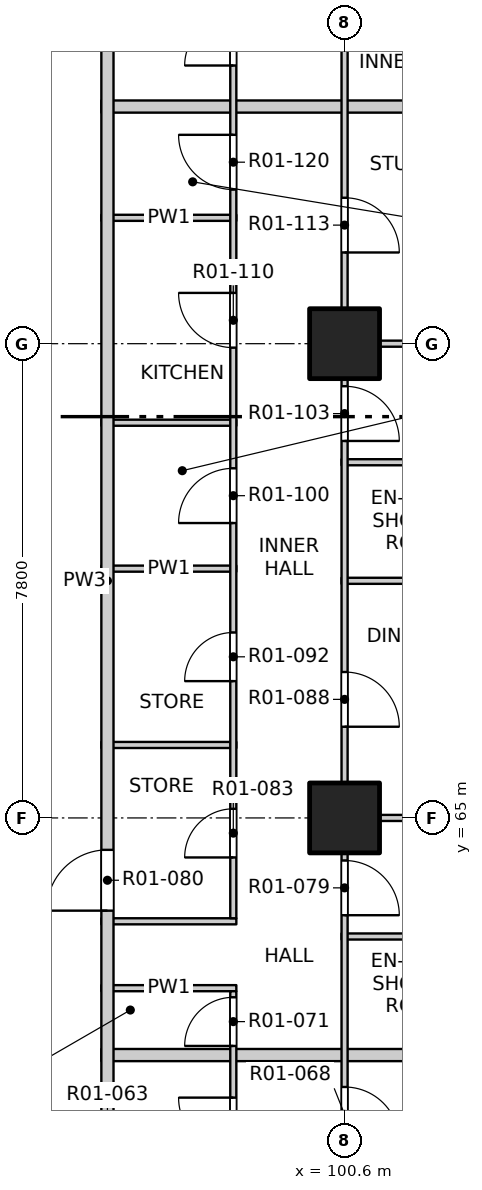
"""IFC4 building model, lengths in metres.
Left out: names, types, materials, properties, quantities, classifications, styles, units other than length and angle.
Written with IfcOpenShell. Run it as: python <this file> out.ifc"""

import sys

from ifc_helpers import new_model, si_unit, direction, frame, frame_2d, origin, origin_2d, place, context, subcontext, project, spatial, rectangle, extrude, element, fill, save


model = new_model("IFC4")
c1 = context("Model", 3, precision=1e-05, world=origin(), true_north=direction((0.0, 1.0)))
c2 = subcontext(c1, "Body", "Model", "MODEL_VIEW")
j1 = project(units=[si_unit("LENGTHUNIT", "METRE"), si_unit("PLANEANGLEUNIT", "RADIAN")], contexts=[c1])
p1 = place(None, origin())
s1 = spatial("IfcSite", under=j1, at=p1, CompositionType="ELEMENT")
p2 = place(p1, origin())
s2 = spatial("IfcBuilding", under=s1, at=p2, CompositionType="ELEMENT")
p3 = place(p2, frame((0.0, 0.0, 26.3)))
s3 = spatial("IfcBuildingStorey", under=s2, at=p3, CompositionType="ELEMENT", Elevation=26.3)
for number, where, z_axis, x_axis in (
    (1, (100.6, 65.0, -0.25), (0.0, 0.0, 1.0), (1.0, 0.0, 0.0)),
    (2, (100.6, 72.8, -0.25), (0.0, 0.0, 1.0), (1.0, 0.0, 0.0)),
):
    element("IfcColumn", number, at=place(p3, frame(where, z_axis=z_axis, x_axis=x_axis)), inside=s3, PredefinedType="COLUMN", context=c2, shape_type="SweptSolid", body=[
        extrude(rectangle(XDim=1.15, YDim=1.15, at=origin_2d()), origin(), (0.0, 0.0, 1.0), 3.4),
    ])
p4 = place(p3, frame((96.6, 61.1, 0.0), z_axis=(0.0, 0.0, 1.0), x_axis=(1.0, 0.0, 0.0)))
e3 = element("IfcWall", 3, at=p4, inside=s3, PredefinedType="PARTITIONING", context=c2, shape_type="SweptSolid", body=[
    extrude(rectangle(XDim=11.5, YDim=0.2, at=frame_2d((5.75, 0.0))), origin(), (0.0, 0.0, 1.0), 3.15),
])
p5 = place(p3, frame((96.6, 62.2, 0.0), z_axis=(0.0, 0.0, 1.0), x_axis=(1.0, 0.0, 0.0)))
e4 = element("IfcWall", 4, at=p5, inside=s3, PredefinedType="PARTITIONING", context=c2, shape_type="SweptSolid", body=[
    extrude(rectangle(XDim=2.22, YDim=0.1, at=frame_2d((1.11, 0.0))), origin(), (0.0, 0.0, 1.0), 3.15),
])
p6 = place(p3, frame((100.55, 63.05, 0.0), z_axis=(0.0, 0.0, 1.0), x_axis=(1.0, 0.0, 0.0)))
e5 = element("IfcWall", 5, at=p6, inside=s3, PredefinedType="PARTITIONING", context=c2, shape_type="SweptSolid", body=[
    extrude(rectangle(XDim=3.7, YDim=0.1, at=frame_2d((1.85, 0.0))), origin(), (0.0, 0.0, 1.0), 3.15),
])
p7 = place(p3, frame((96.6, 63.3, 0.0), z_axis=(0.0, 0.0, 1.0), x_axis=(1.0, 0.0, 0.0)))
e6 = element("IfcWall", 6, at=p7, inside=s3, PredefinedType="PARTITIONING", context=c2, shape_type="SweptSolid", body=[
    extrude(rectangle(XDim=2.22, YDim=0.1, at=frame_2d((1.11, 0.0))), origin(), (0.0, 0.0, 1.0), 3.15),
])
p8 = place(p3, frame((100.55, 65.0, 0.0), z_axis=(0.0, 0.0, 1.0), x_axis=(1.0, 0.0, 0.0)))
e7 = element("IfcWall", 7, at=p8, inside=s3, PredefinedType="PARTITIONING", context=c2, shape_type="SweptSolid", body=[
    extrude(rectangle(XDim=7.55, YDim=0.1, at=frame_2d((3.775, 0.0))), origin(), (0.0, 0.0, 1.0), 2.55),
])
p9 = place(p3, frame((96.6, 66.2, 0.0), z_axis=(0.0, 0.0, 1.0), x_axis=(1.0, 0.0, 0.0)))
e8 = element("IfcWall", 8, at=p9, inside=s3, PredefinedType="PARTITIONING", context=c2, shape_type="SweptSolid", body=[
    extrude(rectangle(XDim=2.22, YDim=0.1, at=frame_2d((1.11, 0.0))), origin(), (0.0, 0.0, 1.0), 3.15),
])
p10 = place(p3, frame((100.55, 68.9, 0.0), z_axis=(0.0, 0.0, 1.0), x_axis=(1.0, 0.0, 0.0)))
e9 = element("IfcWall", 9, at=p10, inside=s3, PredefinedType="PARTITIONING", context=c2, shape_type="SweptSolid", body=[
    extrude(rectangle(XDim=7.55, YDim=0.1, at=frame_2d((3.775, 0.0))), origin(), (0.0, 0.0, 1.0), 3.15),
])
p11 = place(p3, frame((96.6, 69.1, 0.0), z_axis=(0.0, 0.0, 1.0), x_axis=(1.0, 0.0, 0.0)))
e10 = element("IfcWall", 10, at=p11, inside=s3, PredefinedType="PARTITIONING", context=c2, shape_type="SweptSolid", body=[
    extrude(rectangle(XDim=2.22, YDim=0.1, at=frame_2d((1.11, 0.0))), origin(), (0.0, 0.0, 1.0), 3.15),
])
p12 = place(p3, frame((100.55, 70.85, 0.0), z_axis=(0.0, 0.0, 1.0), x_axis=(1.0, 0.0, 0.0)))
e11 = element("IfcWall", 11, at=p12, inside=s3, PredefinedType="PARTITIONING", context=c2, shape_type="SweptSolid", body=[
    extrude(rectangle(XDim=3.7, YDim=0.1, at=frame_2d((1.85, 0.0))), origin(), (0.0, 0.0, 1.0), 3.15),
])
p13 = place(p3, frame((96.6, 71.5, 0.0), z_axis=(0.0, 0.0, 1.0), x_axis=(1.0, 0.0, 0.0)))
e12 = element("IfcWall", 12, at=p13, inside=s3, PredefinedType="PARTITIONING", context=c2, shape_type="SweptSolid", body=[
    extrude(rectangle(XDim=2.22, YDim=0.1, at=frame_2d((1.11, 0.0))), origin(), (0.0, 0.0, 1.0), 3.15),
])
p14 = place(p3, frame((100.55, 72.8, 0.0), z_axis=(0.0, 0.0, 1.0), x_axis=(1.0, 0.0, 0.0)))
e13 = element("IfcWall", 13, at=p14, inside=s3, PredefinedType="PARTITIONING", context=c2, shape_type="SweptSolid", body=[
    extrude(rectangle(XDim=7.55, YDim=0.1, at=frame_2d((3.775, 0.0))), origin(), (0.0, 0.0, 1.0), 2.55),
])
p15 = place(p3, frame((96.6, 74.87, 0.0), z_axis=(0.0, 0.0, 1.0), x_axis=(1.0, 0.0, 0.0)))
e14 = element("IfcWall", 14, at=p15, inside=s3, PredefinedType="PARTITIONING", context=c2, shape_type="SweptSolid", body=[
    extrude(rectangle(XDim=2.22, YDim=0.1, at=frame_2d((1.11, 0.0))), origin(), (0.0, 0.0, 1.0), 3.15),
])
p16 = place(p3, frame((96.6, 76.7, 0.0), z_axis=(0.0, 0.0, 1.0), x_axis=(1.0, 0.0, 0.0)))
e15 = element("IfcWall", 15, at=p16, inside=s3, PredefinedType="PARTITIONING", context=c2, shape_type="SweptSolid", body=[
    extrude(rectangle(XDim=11.5, YDim=0.2, at=frame_2d((5.75, 0.0))), origin(), (0.0, 0.0, 1.0), 3.15),
])
p17 = place(p3, frame((96.7, 53.4, 0.0), z_axis=(0.0, 0.0, 1.0), x_axis=(0.0, 1.0, 0.0)))
e16 = element("IfcWall", 16, at=p17, inside=s3, PredefinedType="PARTITIONING", context=c2, shape_type="SweptSolid", body=[
    extrude(rectangle(XDim=31.0, YDim=0.2, at=frame_2d((15.5, 0.0))), origin(), (0.0, 0.0, 1.0), 3.15),
])
p18 = place(p17, frame((5.575, 0.0, 0.0)))
e17 = element("IfcOpeningElement", 17, at=p18, cuts=e16, PredefinedType="OPENING", context=c2, shape_type="SweptSolid", body=[
    extrude(rectangle(XDim=1.0, YDim=2.1, at=frame_2d((0.5, 1.05))), frame((0.0, 0.11, 0.0), z_axis=(0.0, -1.0, 0.0), x_axis=(1.0, 0.0, 0.0)), (0.0, 0.0, 1.0), 0.22),
])
p19 = place(p17, frame((10.075, 0.0, 0.0)))
e18 = element("IfcOpeningElement", 18, at=p19, cuts=e16, PredefinedType="OPENING", context=c2, shape_type="SweptSolid", body=[
    extrude(rectangle(XDim=1.0, YDim=2.1, at=frame_2d((0.5, 1.05))), frame((0.0, 0.11, 0.0), z_axis=(0.0, -1.0, 0.0), x_axis=(1.0, 0.0, 0.0)), (0.0, 0.0, 1.0), 0.22),
])
p20 = place(p17, frame((28.975, 0.0, 0.0)))
e19 = element("IfcOpeningElement", 19, at=p20, cuts=e16, PredefinedType="OPENING", context=c2, shape_type="SweptSolid", body=[
    extrude(rectangle(XDim=1.0, YDim=2.1, at=frame_2d((0.5, 1.05))), frame((0.0, 0.11, 0.0), z_axis=(0.0, -1.0, 0.0), x_axis=(1.0, 0.0, 0.0)), (0.0, 0.0, 1.0), 0.22),
])
p21 = place(p3, frame((98.77, 58.85, 0.0), z_axis=(0.0, 0.0, 1.0), x_axis=(0.0, 1.0, 0.0)))
e20 = element("IfcWall", 20, at=p21, inside=s3, PredefinedType="PARTITIONING", context=c2, shape_type="SweptSolid", body=[
    extrude(rectangle(XDim=3.3, YDim=0.1, at=frame_2d((1.65, 0.0))), origin(), (0.0, 0.0, 1.0), 3.15),
])
p22 = place(p21, frame((0.65, 0.0, 0.0)))
e21 = element("IfcOpeningElement", 21, at=p22, cuts=e20, PredefinedType="OPENING", context=c2, shape_type="SweptSolid", body=[
    extrude(rectangle(XDim=0.9, YDim=2.1, at=frame_2d((0.45, 1.05))), frame((0.0, 0.06, 0.0), z_axis=(0.0, -1.0, 0.0), x_axis=(1.0, 0.0, 0.0)), (0.0, 0.0, 1.0), 0.12),
])
p23 = place(p21, frame((2.4, 0.0, 0.0)))
e22 = element("IfcOpeningElement", 22, at=p23, cuts=e20, PredefinedType="OPENING", context=c2, shape_type="SweptSolid", body=[
    extrude(rectangle(XDim=0.8, YDim=2.1, at=frame_2d((0.4, 1.05))), frame((0.0, 0.06, 0.0), z_axis=(0.0, -1.0, 0.0), x_axis=(1.0, 0.0, 0.0)), (0.0, 0.0, 1.0), 0.12),
])
p24 = place(p3, frame((98.77, 63.35, 0.0), z_axis=(0.0, 0.0, 1.0), x_axis=(0.0, 1.0, 0.0)))
e23 = element("IfcWall", 23, at=p24, inside=s3, PredefinedType="PARTITIONING", context=c2, shape_type="SweptSolid", body=[
    extrude(rectangle(XDim=17.7, YDim=0.1, at=frame_2d((8.85, 0.0))), origin(), (0.0, 0.0, 1.0), 3.15),
])
p25 = place(p24, frame((1.0, 0.0, 0.0)))
e24 = element("IfcOpeningElement", 24, at=p25, cuts=e23, PredefinedType="OPENING", context=c2, shape_type="SweptSolid", body=[
    extrude(rectangle(XDim=0.8, YDim=2.1, at=frame_2d((0.4, 1.05))), frame((0.0, 0.06, 0.0), z_axis=(0.0, -1.0, 0.0), x_axis=(1.0, 0.0, 0.0)), (0.0, 0.0, 1.0), 0.12),
])
p26 = place(p24, frame((3.9, 0.0, 0.0)))
e25 = element("IfcOpeningElement", 25, at=p26, cuts=e23, PredefinedType="OPENING", context=c2, shape_type="SweptSolid", body=[
    extrude(rectangle(XDim=0.8, YDim=2.1, at=frame_2d((0.4, 1.05))), frame((0.0, 0.06, 0.0), z_axis=(0.0, -1.0, 0.0), x_axis=(1.0, 0.0, 0.0)), (0.0, 0.0, 1.0), 0.12),
])
p27 = place(p24, frame((6.5, 0.0, 0.0)))
e26 = element("IfcOpeningElement", 26, at=p27, cuts=e23, PredefinedType="OPENING", context=c2, shape_type="SweptSolid", body=[
    extrude(rectangle(XDim=0.9, YDim=2.1, at=frame_2d((0.45, 1.05))), frame((0.0, 0.06, 0.0), z_axis=(0.0, -1.0, 0.0), x_axis=(1.0, 0.0, 0.0)), (0.0, 0.0, 1.0), 0.12),
])
p28 = place(p24, frame((9.385, 0.0, 0.0)))
e27 = element("IfcOpeningElement", 27, at=p28, cuts=e23, PredefinedType="OPENING", context=c2, shape_type="SweptSolid", body=[
    extrude(rectangle(XDim=0.9, YDim=2.1, at=frame_2d((0.45, 1.05))), frame((0.0, 0.06, 0.0), z_axis=(0.0, -1.0, 0.0), x_axis=(1.0, 0.0, 0.0)), (0.0, 0.0, 1.0), 0.12),
])
p29 = place(p24, frame((11.985, 0.0, 0.0)))
e28 = element("IfcOpeningElement", 28, at=p29, cuts=e23, PredefinedType="OPENING", context=c2, shape_type="SweptSolid", body=[
    extrude(rectangle(XDim=0.9, YDim=2.1, at=frame_2d((0.45, 1.05))), frame((0.0, 0.06, 0.0), z_axis=(0.0, -1.0, 0.0), x_axis=(1.0, 0.0, 0.0)), (0.0, 0.0, 1.0), 0.12),
])
p30 = place(p24, frame((14.025, 0.0, 0.0)))
e29 = element("IfcOpeningElement", 29, at=p30, cuts=e23, PredefinedType="OPENING", context=c2, shape_type="SweptSolid", body=[
    extrude(rectangle(XDim=0.8, YDim=2.1, at=frame_2d((0.4, 1.05))), frame((0.0, 0.06, 0.0), z_axis=(0.0, -1.0, 0.0), x_axis=(1.0, 0.0, 0.0)), (0.0, 0.0, 1.0), 0.12),
])
p31 = place(p24, frame((16.175, 0.0, 0.0)))
e30 = element("IfcOpeningElement", 30, at=p31, cuts=e23, PredefinedType="OPENING", context=c2, shape_type="SweptSolid", body=[
    extrude(rectangle(XDim=0.9, YDim=2.1, at=frame_2d((0.45, 1.05))), frame((0.0, 0.06, 0.0), z_axis=(0.0, -1.0, 0.0), x_axis=(1.0, 0.0, 0.0)), (0.0, 0.0, 1.0), 0.12),
])
p32 = place(p3, frame((100.6, 49.4, 0.0), z_axis=(0.0, 0.0, 1.0), x_axis=(0.0, 1.0, 0.0)))
e31 = element("IfcWall", 31, at=p32, inside=s3, PredefinedType="PARTITIONING", context=c2, shape_type="SweptSolid", body=[
    extrude(rectangle(XDim=31.2, YDim=0.1, at=frame_2d((15.6, 0.0))), origin(), (0.0, 0.0, 1.0), 3.15),
])
p33 = place(p32, frame((1.5, 0.0, 0.0)))
e32 = element("IfcOpeningElement", 32, at=p33, cuts=e31, PredefinedType="OPENING", context=c2, shape_type="SweptSolid", body=[
    extrude(rectangle(XDim=0.9, YDim=2.1, at=frame_2d((0.45, 1.05))), frame((0.0, 0.06, 0.0), z_axis=(0.0, -1.0, 0.0), x_axis=(1.0, 0.0, 0.0)), (0.0, 0.0, 1.0), 0.12),
])
p34 = place(p32, frame((5.4, 0.0, 0.0)))
e33 = element("IfcOpeningElement", 33, at=p34, cuts=e31, PredefinedType="OPENING", context=c2, shape_type="SweptSolid", body=[
    extrude(rectangle(XDim=0.9, YDim=2.1, at=frame_2d((0.45, 1.05))), frame((0.0, 0.06, 0.0), z_axis=(0.0, -1.0, 0.0), x_axis=(1.0, 0.0, 0.0)), (0.0, 0.0, 1.0), 0.12),
])
p35 = place(p32, frame((10.275, 0.0, 0.0)))
e34 = element("IfcOpeningElement", 34, at=p35, cuts=e31, PredefinedType="OPENING", context=c2, shape_type="SweptSolid", body=[
    extrude(rectangle(XDim=0.9, YDim=2.1, at=frame_2d((0.45, 1.05))), frame((0.0, 0.06, 0.0), z_axis=(0.0, -1.0, 0.0), x_axis=(1.0, 0.0, 0.0)), (0.0, 0.0, 1.0), 0.12),
])
p36 = place(p32, frame((14.0, 0.0, 0.0)))
e35 = element("IfcOpeningElement", 35, at=p36, cuts=e31, PredefinedType="OPENING", context=c2, shape_type="SweptSolid", body=[
    extrude(rectangle(XDim=0.9, YDim=2.1, at=frame_2d((0.45, 1.05))), frame((0.0, 0.06, 0.0), z_axis=(0.0, -1.0, 0.0), x_axis=(1.0, 0.0, 0.0)), (0.0, 0.0, 1.0), 0.12),
])
p37 = place(p32, frame((17.1, 0.0, 0.0)))
e36 = element("IfcOpeningElement", 36, at=p37, cuts=e31, PredefinedType="OPENING", context=c2, shape_type="SweptSolid", body=[
    extrude(rectangle(XDim=0.9, YDim=2.1, at=frame_2d((0.45, 1.05))), frame((0.0, 0.06, 0.0), z_axis=(0.0, -1.0, 0.0), x_axis=(1.0, 0.0, 0.0)), (0.0, 0.0, 1.0), 0.12),
])
p38 = place(p32, frame((21.8, 0.0, 0.0)))
e37 = element("IfcOpeningElement", 37, at=p38, cuts=e31, PredefinedType="OPENING", context=c2, shape_type="SweptSolid", body=[
    extrude(rectangle(XDim=0.9, YDim=2.1, at=frame_2d((0.45, 1.05))), frame((0.0, 0.06, 0.0), z_axis=(0.0, -1.0, 0.0), x_axis=(1.0, 0.0, 0.0)), (0.0, 0.0, 1.0), 0.12),
])
p39 = place(p32, frame((24.9, 0.0, 0.0)))
e38 = element("IfcOpeningElement", 38, at=p39, cuts=e31, PredefinedType="OPENING", context=c2, shape_type="SweptSolid", body=[
    extrude(rectangle(XDim=0.9, YDim=2.1, at=frame_2d((0.45, 1.05))), frame((0.0, 0.06, 0.0), z_axis=(0.0, -1.0, 0.0), x_axis=(1.0, 0.0, 0.0)), (0.0, 0.0, 1.0), 0.12),
])
p40 = place(p32, frame((28.8, 0.0, 0.0)))
e39 = element("IfcOpeningElement", 39, at=p40, cuts=e31, PredefinedType="OPENING", context=c2, shape_type="SweptSolid", body=[
    extrude(rectangle(XDim=0.9, YDim=2.1, at=frame_2d((0.45, 1.05))), frame((0.0, 0.06, 0.0), z_axis=(0.0, -1.0, 0.0), x_axis=(1.0, 0.0, 0.0)), (0.0, 0.0, 1.0), 0.12),
])
p41 = place(p22, origin())
e40 = element("IfcDoor", 40, at=p41, inside=s3, OperationType="SINGLE_SWING_RIGHT", PredefinedType="DOOR", context=c2, shape_type="SweptSolid", body=[
    extrude(rectangle(XDim=0.9, YDim=2.1, at=frame_2d((0.45, 1.05))), frame((0.0, 0.025, 0.0), z_axis=(0.0, -1.0, 0.0), x_axis=(1.0, 0.0, 0.0)), (0.0, 0.0, 1.0), 0.05),
])
fill(e21, e40)
p42 = place(p35, origin())
e41 = element("IfcDoor", 41, at=p42, inside=s3, OperationType="SINGLE_SWING_RIGHT", PredefinedType="DOOR", context=c2, shape_type="SweptSolid", body=[
    extrude(rectangle(XDim=0.9, YDim=2.1, at=frame_2d((0.45, 1.05))), frame((0.0, 0.025, 0.0), z_axis=(0.0, -1.0, 0.0), x_axis=(1.0, 0.0, 0.0)), (0.0, 0.0, 1.0), 0.05),
])
fill(e34, e41)
p43 = place(p23, origin())
e42 = element("IfcDoor", 42, at=p43, inside=s3, OperationType="SINGLE_SWING_LEFT", PredefinedType="DOOR", context=c2, shape_type="SweptSolid", body=[
    extrude(rectangle(XDim=0.8, YDim=2.1, at=frame_2d((0.4, 1.05))), frame((0.0, 0.025, 0.0), z_axis=(0.0, -1.0, 0.0), x_axis=(1.0, 0.0, 0.0)), (0.0, 0.0, 1.0), 0.05),
])
fill(e22, e42)
p44 = place(p36, origin())
e43 = element("IfcDoor", 43, at=p44, inside=s3, OperationType="SINGLE_SWING_RIGHT", PredefinedType="DOOR", context=c2, shape_type="SweptSolid", body=[
    extrude(rectangle(XDim=0.9, YDim=2.1, at=frame_2d((0.45, 1.05))), frame((0.0, 0.025, 0.0), z_axis=(0.0, -1.0, 0.0), x_axis=(1.0, 0.0, 0.0)), (0.0, 0.0, 1.0), 0.05),
])
fill(e35, e43)
p45 = place(p19, origin())
e44 = element("IfcDoor", 44, at=p45, inside=s3, OperationType="SINGLE_SWING_LEFT", PredefinedType="DOOR", context=c2, shape_type="SweptSolid", body=[
    extrude(rectangle(XDim=1.0, YDim=2.1, at=frame_2d((0.5, 1.05))), frame((0.0, 0.025, 0.0), z_axis=(0.0, -1.0, 0.0), x_axis=(1.0, 0.0, 0.0)), (0.0, 0.0, 1.0), 0.05),
])
fill(e18, e44)
p46 = place(p25, origin())
e45 = element("IfcDoor", 45, at=p46, inside=s3, OperationType="SINGLE_SWING_LEFT", PredefinedType="DOOR", context=c2, shape_type="SweptSolid", body=[
    extrude(rectangle(XDim=0.8, YDim=2.1, at=frame_2d((0.4, 1.05))), frame((0.0, 0.025, 0.0), z_axis=(0.0, -1.0, 0.0), x_axis=(1.0, 0.0, 0.0)), (0.0, 0.0, 1.0), 0.05),
])
fill(e24, e45)
p47 = place(p37, origin())
e46 = element("IfcDoor", 46, at=p47, inside=s3, OperationType="SINGLE_SWING_RIGHT", PredefinedType="DOOR", context=c2, shape_type="SweptSolid", body=[
    extrude(rectangle(XDim=0.9, YDim=2.1, at=frame_2d((0.45, 1.05))), frame((0.0, 0.025, 0.0), z_axis=(0.0, -1.0, 0.0), x_axis=(1.0, 0.0, 0.0)), (0.0, 0.0, 1.0), 0.05),
])
fill(e36, e46)
p48 = place(p26, origin())
e47 = element("IfcDoor", 47, at=p48, inside=s3, OperationType="SINGLE_SWING_LEFT", PredefinedType="DOOR", context=c2, shape_type="SweptSolid", body=[
    extrude(rectangle(XDim=0.8, YDim=2.1, at=frame_2d((0.4, 1.05))), frame((0.0, 0.025, 0.0), z_axis=(0.0, -1.0, 0.0), x_axis=(1.0, 0.0, 0.0)), (0.0, 0.0, 1.0), 0.05),
])
fill(e25, e47)
p49 = place(p27, origin())
e48 = element("IfcDoor", 48, at=p49, inside=s3, OperationType="SINGLE_SWING_LEFT", PredefinedType="DOOR", context=c2, shape_type="SweptSolid", body=[
    extrude(rectangle(XDim=0.9, YDim=2.1, at=frame_2d((0.45, 1.05))), frame((0.0, 0.025, 0.0), z_axis=(0.0, -1.0, 0.0), x_axis=(1.0, 0.0, 0.0)), (0.0, 0.0, 1.0), 0.05),
])
fill(e26, e48)
p50 = place(p38, origin())
e49 = element("IfcDoor", 49, at=p50, inside=s3, OperationType="SINGLE_SWING_RIGHT", PredefinedType="DOOR", context=c2, shape_type="SweptSolid", body=[
    extrude(rectangle(XDim=0.9, YDim=2.1, at=frame_2d((0.45, 1.05))), frame((0.0, 0.025, 0.0), z_axis=(0.0, -1.0, 0.0), x_axis=(1.0, 0.0, 0.0)), (0.0, 0.0, 1.0), 0.05),
])
fill(e37, e49)
p51 = place(p28, origin())
e50 = element("IfcDoor", 50, at=p51, inside=s3, OperationType="SINGLE_SWING_RIGHT", PredefinedType="DOOR", context=c2, shape_type="SweptSolid", body=[
    extrude(rectangle(XDim=0.9, YDim=2.1, at=frame_2d((0.45, 1.05))), frame((0.0, 0.025, 0.0), z_axis=(0.0, -1.0, 0.0), x_axis=(1.0, 0.0, 0.0)), (0.0, 0.0, 1.0), 0.05),
])
fill(e27, e50)
p52 = place(p39, origin())
e51 = element("IfcDoor", 51, at=p52, inside=s3, OperationType="SINGLE_SWING_RIGHT", PredefinedType="DOOR", context=c2, shape_type="SweptSolid", body=[
    extrude(rectangle(XDim=0.9, YDim=2.1, at=frame_2d((0.45, 1.05))), frame((0.0, 0.025, 0.0), z_axis=(0.0, -1.0, 0.0), x_axis=(1.0, 0.0, 0.0)), (0.0, 0.0, 1.0), 0.05),
])
fill(e38, e51)
p53 = place(p29, origin())
e52 = element("IfcDoor", 52, at=p53, inside=s3, OperationType="SINGLE_SWING_RIGHT", PredefinedType="DOOR", context=c2, shape_type="SweptSolid", body=[
    extrude(rectangle(XDim=0.9, YDim=2.1, at=frame_2d((0.45, 1.05))), frame((0.0, 0.025, 0.0), z_axis=(0.0, -1.0, 0.0), x_axis=(1.0, 0.0, 0.0)), (0.0, 0.0, 1.0), 0.05),
])
fill(e28, e52)
p54 = place(p30, origin())
e53 = element("IfcDoor", 53, at=p54, inside=s3, OperationType="SINGLE_SWING_LEFT", PredefinedType="DOOR", context=c2, shape_type="SweptSolid", body=[
    extrude(rectangle(XDim=0.8, YDim=2.1, at=frame_2d((0.4, 1.05))), frame((0.0, 0.025, 0.0), z_axis=(0.0, -1.0, 0.0), x_axis=(1.0, 0.0, 0.0)), (0.0, 0.0, 1.0), 0.05),
])
fill(e29, e53)
save(model, sys.argv[1])
